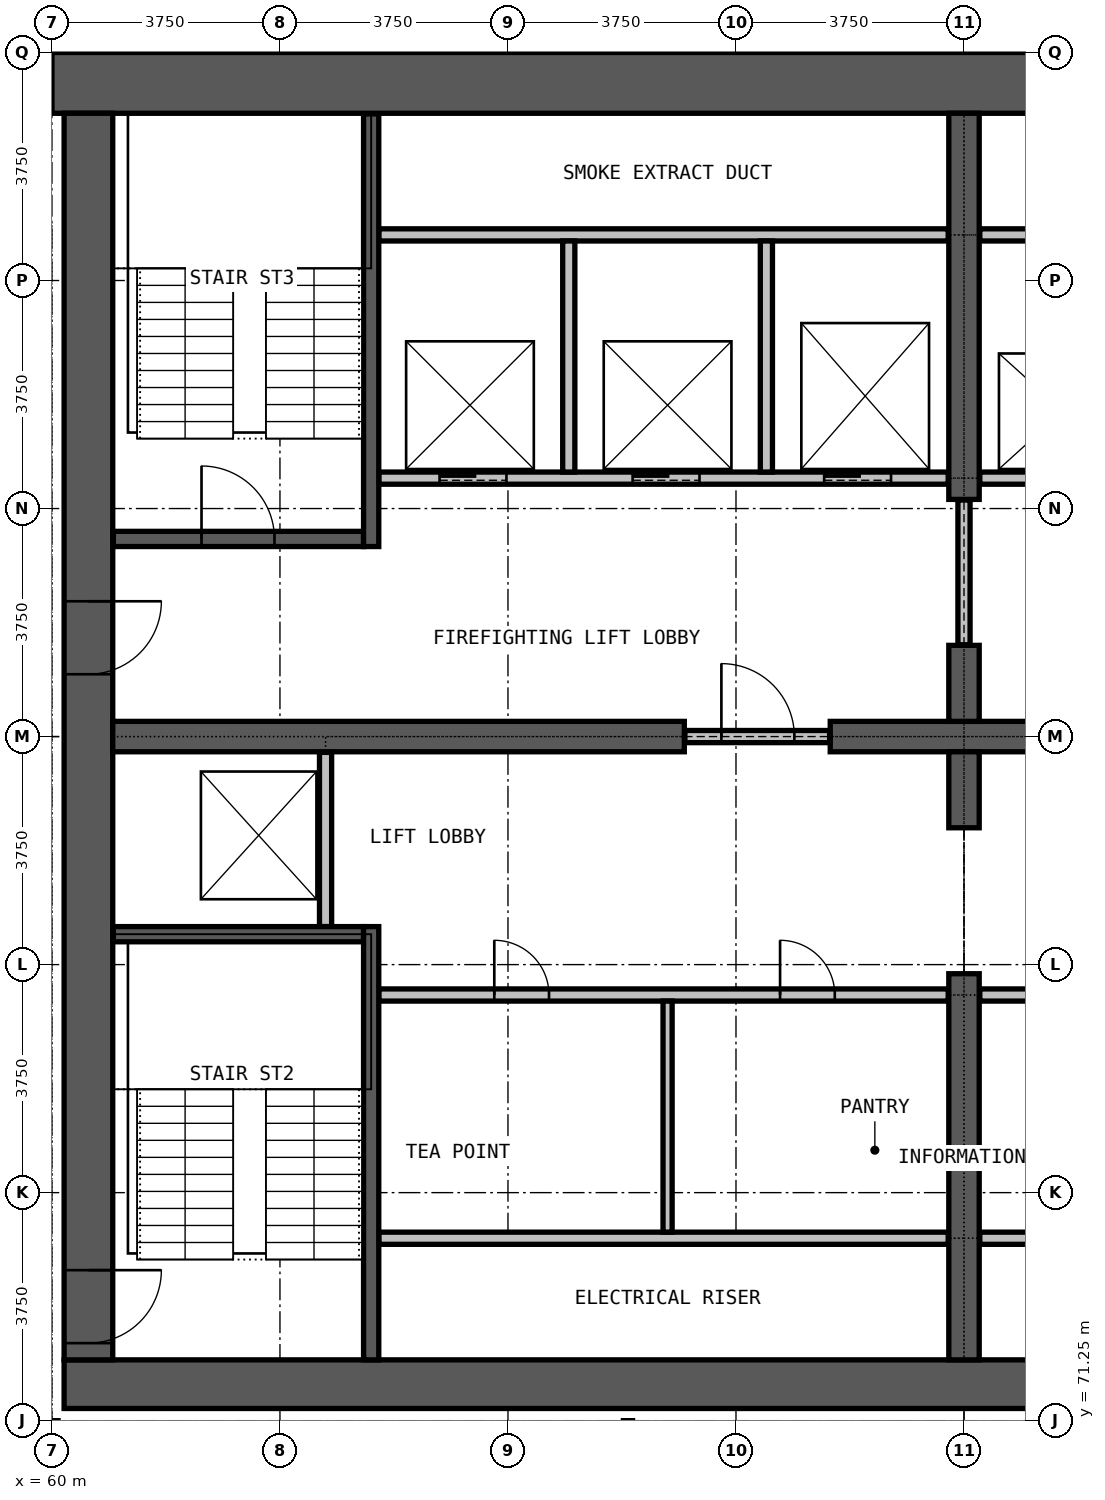
"""IFC4 building model, lengths in metres.
Left out: names, types, materials, properties, quantities, classifications, styles, units other than length and angle.
Written with IfcOpenShell. Run it as: python <this file> out.ifc"""

import sys

from ifc_helpers import new_model, si_unit, direction, frame, frame_2d, origin, place, context, subcontext, project, spatial, rectangle, extrude, element, fill, save


model = new_model("IFC4")
c1 = context("Model", 3, precision=1e-05, world=origin(), true_north=direction((0.0, 1.0)))
c2 = subcontext(c1, "Body", "Model", "MODEL_VIEW")
j1 = project(units=[si_unit("LENGTHUNIT", "METRE"), si_unit("PLANEANGLEUNIT", "RADIAN")], contexts=[c1])
p1 = place(None, origin())
s1 = spatial("IfcSite", under=j1, at=p1, CompositionType="ELEMENT")
p2 = place(p1, origin())
s2 = spatial("IfcBuilding", under=s1, at=p2, CompositionType="ELEMENT")
p3 = place(p2, frame((0.0, 0.0, 180.1)))
s3 = spatial("IfcBuildingStorey", under=s2, at=p3, CompositionType="ELEMENT", Elevation=180.1)
p4 = place(p3, frame((60.2, 71.85, 0.0), z_axis=(0.0, 0.0, 1.0), x_axis=(1.0, 0.0, 0.0)))
e1 = element("IfcWall", 1, at=p4, inside=s3, PredefinedType="SHEAR", context=c2, shape_type="SweptSolid", body=[
    extrude(rectangle(XDim=29.6, YDim=0.8, at=frame_2d((14.8, 0.0))), origin(), (0.0, 0.0, 1.0), 3.6),
])
p5 = place(p3, frame((90.0, 93.25, 0.0), z_axis=(0.0, 0.0, 1.0), x_axis=(-1.0, 0.0, 0.0)))
e2 = element("IfcWall", 2, at=p5, inside=s3, PredefinedType="SHEAR", context=c2, shape_type="SweptSolid", body=[
    extrude(rectangle(XDim=30.0, YDim=1.0, at=frame_2d((15.0, 0.0))), origin(), (0.0, 0.0, 1.0), 3.6),
])
p6 = place(p3, frame((60.6, 92.75, 0.0), z_axis=(0.0, 0.0, 1.0), x_axis=(0.0, -1.0, 0.0)))
e3 = element("IfcWall", 3, at=p6, inside=s3, PredefinedType="SHEAR", context=c2, shape_type="SweptSolid", body=[
    extrude(rectangle(XDim=20.5, YDim=0.8, at=frame_2d((10.25, 0.0))), origin(), (0.0, 0.0, 1.0), 3.6),
])
p7 = place(p6, frame((19.025, 0.0, 0.0)))
e4 = element("IfcOpeningElement", 4, at=p7, cuts=e3, PredefinedType="OPENING", context=c2, shape_type="SweptSolid", body=[
    extrude(rectangle(XDim=1.2, YDim=2.2, at=frame_2d((0.6, 1.1))), frame((0.0, 0.41, 0.0), z_axis=(0.0, -1.0, 0.0), x_axis=(1.0, 0.0, 0.0)), (0.0, 0.0, 1.0), 0.82),
])
p8 = place(p6, frame((8.025, 0.0, 0.0)))
e5 = element("IfcOpeningElement", 5, at=p8, cuts=e3, PredefinedType="OPENING", context=c2, shape_type="SweptSolid", body=[
    extrude(rectangle(XDim=1.2, YDim=2.2, at=frame_2d((0.6, 1.1))), frame((0.0, 0.41, 0.0), z_axis=(0.0, -1.0, 0.0), x_axis=(1.0, 0.0, 0.0)), (0.0, 0.0, 1.0), 0.82),
])
p9 = place(p3, frame((61.0, 82.5, 0.0), z_axis=(0.0, 0.0, 1.0), x_axis=(1.0, 0.0, 0.0)))
e6 = element("IfcWall", 6, at=p9, inside=s3, PredefinedType="SHEAR", context=c2, shape_type="SweptSolid", body=[
    extrude(rectangle(XDim=9.4, YDim=0.5, at=frame_2d((4.7, 0.0))), origin(), (0.0, 0.0, 1.0), 3.6),
])
p10 = place(p3, frame((72.8, 82.5, 0.0), z_axis=(0.0, 0.0, 1.0), x_axis=(1.0, 0.0, 0.0)))
e7 = element("IfcWall", 7, at=p10, inside=s3, PredefinedType="SHEAR", context=c2, shape_type="SweptSolid", body=[
    extrude(rectangle(XDim=4.4, YDim=0.5, at=frame_2d((2.2, 0.0))), origin(), (0.0, 0.0, 1.0), 3.6),
])
p11 = place(p3, frame((75.0, 72.25, 0.0), z_axis=(0.0, 0.0, 1.0), x_axis=(0.0, 1.0, 0.0)))
e8 = element("IfcWall", 8, at=p11, inside=s3, PredefinedType="SHEAR", context=c2, shape_type="SweptSolid", body=[
    extrude(rectangle(XDim=6.35, YDim=0.5, at=frame_2d((3.175, 0.0))), origin(), (0.0, 0.0, 1.0), 3.6),
])
for number, where, z_axis, x_axis in (
    (9, (75.0, 81.0, 0.0), (0.0, 0.0, 1.0), (0.0, 1.0, 0.0)),
    (10, (75.0, 82.75, 0.0), (0.0, 0.0, 1.0), (0.0, 1.0, 0.0)),
):
    element("IfcWall", number, at=place(p3, frame(where, z_axis=z_axis, x_axis=x_axis)), inside=s3, PredefinedType="SHEAR", context=c2, shape_type="SweptSolid", body=[
        extrude(rectangle(XDim=1.25, YDim=0.5, at=frame_2d((0.625, 0.0))), origin(), (0.0, 0.0, 1.0), 3.6),
    ])
p12 = place(p3, frame((75.0, 86.4, 0.0), z_axis=(0.0, 0.0, 1.0), x_axis=(0.0, 1.0, 0.0)))
e11 = element("IfcWall", 11, at=p12, inside=s3, PredefinedType="SHEAR", context=c2, shape_type="SweptSolid", body=[
    extrude(rectangle(XDim=6.35, YDim=0.5, at=frame_2d((3.175, 0.0))), origin(), (0.0, 0.0, 1.0), 3.6),
])
for number, where, z_axis, x_axis in (
    (12, (65.375, 74.25, 0.0), (0.0, 0.0, 1.0), (1.0, 0.0, 0.0)),
    (13, (75.26, 74.25, 0.0), (0.0, 0.0, 1.0), (1.0, 0.0, 0.0)),
):
    element("IfcWall", number, at=place(p3, frame(where, z_axis=z_axis, x_axis=x_axis)), inside=s3, PredefinedType="PARTITIONING", context=c2, shape_type="SweptSolid", body=[
        extrude(rectangle(XDim=9.365, YDim=0.2, at=frame_2d((4.683, 0.0))), origin(), (0.0, 0.0, 1.0), 3.25),
    ])
p13 = place(p3, frame((65.375, 78.25, 0.0), z_axis=(0.0, 0.0, 1.0), x_axis=(1.0, 0.0, 0.0)))
e14 = element("IfcWall", 14, at=p13, inside=s3, PredefinedType="PARTITIONING", context=c2, shape_type="SweptSolid", body=[
    extrude(rectangle(XDim=9.365, YDim=0.2, at=frame_2d((4.683, 0.0))), origin(), (0.0, 0.0, 1.0), 3.25),
])
p14 = place(p13, frame((1.9, 0.0, 0.0)))
e15 = element("IfcOpeningElement", 15, at=p14, cuts=e14, PredefinedType="OPENING", context=c2, shape_type="SweptSolid", body=[
    extrude(rectangle(XDim=0.9, YDim=2.2, at=frame_2d((0.45, 1.1))), frame((0.0, 0.11, 0.0), z_axis=(0.0, -1.0, 0.0), x_axis=(1.0, 0.0, 0.0)), (0.0, 0.0, 1.0), 0.22),
])
p15 = place(p13, frame((6.6, 0.0, 0.0)))
e16 = element("IfcOpeningElement", 16, at=p15, cuts=e14, PredefinedType="OPENING", context=c2, shape_type="SweptSolid", body=[
    extrude(rectangle(XDim=0.9, YDim=2.2, at=frame_2d((0.45, 1.1))), frame((0.0, 0.11, 0.0), z_axis=(0.0, -1.0, 0.0), x_axis=(1.0, 0.0, 0.0)), (0.0, 0.0, 1.0), 0.22),
])
p16 = place(p3, frame((75.26, 78.25, 0.0), z_axis=(0.0, 0.0, 1.0), x_axis=(1.0, 0.0, 0.0)))
e17 = element("IfcWall", 17, at=p16, inside=s3, PredefinedType="PARTITIONING", context=c2, shape_type="SweptSolid", body=[
    extrude(rectangle(XDim=9.365, YDim=0.2, at=frame_2d((4.683, 0.0))), origin(), (0.0, 0.0, 1.0), 3.25),
])
p17 = place(p16, frame((0.9, 0.0, 0.0)))
e18 = element("IfcOpeningElement", 18, at=p17, cuts=e17, PredefinedType="OPENING", context=c2, shape_type="SweptSolid", body=[
    extrude(rectangle(XDim=0.9, YDim=2.2, at=frame_2d((0.45, 1.1))), frame((0.0, 0.11, 0.0), z_axis=(0.0, -1.0, 0.0), x_axis=(1.0, 0.0, 0.0)), (0.0, 0.0, 1.0), 0.22),
])
p18 = place(p16, frame((5.58, 0.0, 0.0)))
e19 = element("IfcOpeningElement", 19, at=p18, cuts=e17, PredefinedType="OPENING", context=c2, shape_type="SweptSolid", body=[
    extrude(rectangle(XDim=0.9, YDim=2.2, at=frame_2d((0.45, 1.1))), frame((0.0, 0.11, 0.0), z_axis=(0.0, -1.0, 0.0), x_axis=(1.0, 0.0, 0.0)), (0.0, 0.0, 1.0), 0.22),
])
p19 = place(p3, frame((70.41, 82.5, 0.0), z_axis=(0.0, 0.0, 1.0), x_axis=(1.0, 0.0, 0.0)))
e20 = element("IfcWall", 20, at=p19, inside=s3, PredefinedType="PARTITIONING", context=c2, shape_type="SweptSolid", body=[
    extrude(rectangle(XDim=2.38, YDim=0.2, at=frame_2d((1.19, 0.0))), origin(), (0.0, 0.0, 1.0), 2.4),
])
p20 = place(p19, frame((0.6, 0.0, 0.0)))
e21 = element("IfcOpeningElement", 21, at=p20, cuts=e20, PredefinedType="OPENING", context=c2, shape_type="SweptSolid", body=[
    extrude(rectangle(XDim=1.2, YDim=2.2, at=frame_2d((0.6, 1.1))), frame((0.0, 0.11, 0.0), z_axis=(0.0, -1.0, 0.0), x_axis=(1.0, 0.0, 0.0)), (0.0, 0.0, 1.0), 0.22),
])
p21 = place(p3, frame((75.0, 84.01, 0.0), z_axis=(0.0, 0.0, 1.0), x_axis=(0.0, 1.0, 0.0)))
e22 = element("IfcWall", 22, at=p21, inside=s3, PredefinedType="PARTITIONING", context=c2, shape_type="SweptSolid", body=[
    extrude(rectangle(XDim=2.38, YDim=0.2, at=frame_2d((1.19, 0.0))), origin(), (0.0, 0.0, 1.0), 2.4),
])
p22 = place(p3, frame((70.125, 74.35, 0.0), z_axis=(0.0, 0.0, 1.0), x_axis=(0.0, 1.0, 0.0)))
e23 = element("IfcWall", 23, at=p22, inside=s3, PredefinedType="PARTITIONING", context=c2, shape_type="SweptSolid", body=[
    extrude(rectangle(XDim=3.8, YDim=0.15, at=frame_2d((1.9, 0.0))), origin(), (0.0, 0.0, 1.0), 3.25),
])
p23 = place(p3, frame((65.375, 86.75, 0.0), z_axis=(0.0, 0.0, 1.0), x_axis=(1.0, 0.0, 0.0)))
e24 = element("IfcWall", 24, at=p23, inside=s3, PredefinedType="PARTITIONING", context=c2, shape_type="SweptSolid", body=[
    extrude(rectangle(XDim=9.365, YDim=0.2, at=frame_2d((4.683, 0.0))), origin(), (0.0, 0.0, 1.0), 3.25),
])
p24 = place(p23, frame((1.0, 0.0, 0.0)))
e25 = element("IfcOpeningElement", 25, at=p24, cuts=e24, PredefinedType="OPENING", context=c2, shape_type="SweptSolid", body=[
    extrude(rectangle(XDim=1.1, YDim=2.2, at=frame_2d((0.55, 1.1))), frame((0.0, 0.11, 0.0), z_axis=(0.0, -1.0, 0.0), x_axis=(1.0, 0.0, 0.0)), (0.0, 0.0, 1.0), 0.22),
])
p25 = place(p23, frame((4.175, 0.0, 0.0)))
e26 = element("IfcOpeningElement", 26, at=p25, cuts=e24, PredefinedType="OPENING", context=c2, shape_type="SweptSolid", body=[
    extrude(rectangle(XDim=1.1, YDim=2.2, at=frame_2d((0.55, 1.1))), frame((0.0, 0.11, 0.0), z_axis=(0.0, -1.0, 0.0), x_axis=(1.0, 0.0, 0.0)), (0.0, 0.0, 1.0), 0.22),
])
p26 = place(p23, frame((7.325, 0.0, 0.0)))
e27 = element("IfcOpeningElement", 27, at=p26, cuts=e24, PredefinedType="OPENING", context=c2, shape_type="SweptSolid", body=[
    extrude(rectangle(XDim=1.1, YDim=2.2, at=frame_2d((0.55, 1.1))), frame((0.0, 0.11, 0.0), z_axis=(0.0, -1.0, 0.0), x_axis=(1.0, 0.0, 0.0)), (0.0, 0.0, 1.0), 0.22),
])
p27 = place(p3, frame((75.26, 86.75, 0.0), z_axis=(0.0, 0.0, 1.0), x_axis=(1.0, 0.0, 0.0)))
e28 = element("IfcWall", 28, at=p27, inside=s3, PredefinedType="PARTITIONING", context=c2, shape_type="SweptSolid", body=[
    extrude(rectangle(XDim=9.365, YDim=0.2, at=frame_2d((4.683, 0.0))), origin(), (0.0, 0.0, 1.0), 3.25),
])
p28 = place(p27, frame((0.95, 0.0, 0.0)))
e29 = element("IfcOpeningElement", 29, at=p28, cuts=e28, PredefinedType="OPENING", context=c2, shape_type="SweptSolid", body=[
    extrude(rectangle(XDim=1.1, YDim=2.2, at=frame_2d((0.55, 1.1))), frame((0.0, 0.11, 0.0), z_axis=(0.0, -1.0, 0.0), x_axis=(1.0, 0.0, 0.0)), (0.0, 0.0, 1.0), 0.22),
])
p29 = place(p27, frame((4.09, 0.0, 0.0)))
e30 = element("IfcOpeningElement", 30, at=p29, cuts=e28, PredefinedType="OPENING", context=c2, shape_type="SweptSolid", body=[
    extrude(rectangle(XDim=1.1, YDim=2.2, at=frame_2d((0.55, 1.1))), frame((0.0, 0.11, 0.0), z_axis=(0.0, -1.0, 0.0), x_axis=(1.0, 0.0, 0.0)), (0.0, 0.0, 1.0), 0.22),
])
p30 = place(p27, frame((7.24, 0.0, 0.0)))
e31 = element("IfcOpeningElement", 31, at=p30, cuts=e28, PredefinedType="OPENING", context=c2, shape_type="SweptSolid", body=[
    extrude(rectangle(XDim=1.1, YDim=2.2, at=frame_2d((0.55, 1.1))), frame((0.0, 0.11, 0.0), z_axis=(0.0, -1.0, 0.0), x_axis=(1.0, 0.0, 0.0)), (0.0, 0.0, 1.0), 0.22),
])
for number, where, z_axis, x_axis in (
    (32, (65.375, 90.75, 0.0), (0.0, 0.0, 1.0), (1.0, 0.0, 0.0)),
    (33, (75.26, 90.75, 0.0), (0.0, 0.0, 1.0), (1.0, 0.0, 0.0)),
):
    element("IfcWall", number, at=place(p3, frame(where, z_axis=z_axis, x_axis=x_axis)), inside=s3, PredefinedType="PARTITIONING", context=c2, shape_type="SweptSolid", body=[
        extrude(rectangle(XDim=9.365, YDim=0.2, at=frame_2d((4.683, 0.0))), origin(), (0.0, 0.0, 1.0), 3.25),
    ])
p31 = place(p3, frame((64.5, 79.375, 0.0), z_axis=(0.0, 0.0, 1.0), x_axis=(0.0, 1.0, 0.0)))
e34 = element("IfcWall", 34, at=p31, inside=s3, PredefinedType="PARTITIONING", context=c2, shape_type="SweptSolid", body=[
    extrude(rectangle(XDim=2.865, YDim=0.2, at=frame_2d((1.433, 0.0))), origin(), (0.0, 0.0, 1.0), 3.25),
])
for number, where, z_axis, x_axis in (
    (35, (68.5, 86.85, 0.0), (0.0, 0.0, 1.0), (0.0, 1.0, 0.0)),
    (36, (71.75, 86.85, 0.0), (0.0, 0.0, 1.0), (0.0, 1.0, 0.0)),
):
    element("IfcWall", number, at=place(p3, frame(where, z_axis=z_axis, x_axis=x_axis)), inside=s3, PredefinedType="PARTITIONING", context=c2, shape_type="SweptSolid", body=[
        extrude(rectangle(XDim=3.8, YDim=0.2, at=frame_2d((1.9, 0.0))), origin(), (0.0, 0.0, 1.0), 3.25),
    ])
p32 = place(p3, frame((61.01, 79.25, 0.0), z_axis=(0.0, 0.0, 1.0), x_axis=(1.0, 0.0, 0.0)))
e37 = element("IfcWall", 37, at=p32, inside=s3, PredefinedType="PARTITIONING", context=c2, shape_type="SweptSolid", body=[
    extrude(rectangle(XDim=4.115, YDim=0.25, at=frame_2d((2.058, 0.0))), origin(), (0.0, 0.0, 1.0), 3.25),
])
p33 = place(p3, frame((61.01, 85.75, 0.0), z_axis=(0.0, 0.0, 1.0), x_axis=(1.0, 0.0, 0.0)))
e38 = element("IfcWall", 38, at=p33, inside=s3, PredefinedType="PARTITIONING", context=c2, shape_type="SweptSolid", body=[
    extrude(rectangle(XDim=4.115, YDim=0.25, at=frame_2d((2.058, 0.0))), origin(), (0.0, 0.0, 1.0), 3.25),
])
p34 = place(p33, frame((1.45, 0.0, 0.0)))
e39 = element("IfcOpeningElement", 39, at=p34, cuts=e38, PredefinedType="OPENING", context=c2, shape_type="SweptSolid", body=[
    extrude(rectangle(XDim=1.2, YDim=2.2, at=frame_2d((0.6, 1.1))), frame((0.0, 0.135, 0.0), z_axis=(0.0, -1.0, 0.0), x_axis=(1.0, 0.0, 0.0)), (0.0, 0.0, 1.0), 0.27),
])
p35 = place(p3, frame((65.25, 72.25, 0.0), z_axis=(0.0, 0.0, 1.0), x_axis=(0.0, 1.0, 0.0)))
e40 = element("IfcWall", 40, at=p35, inside=s3, PredefinedType="PARTITIONING", context=c2, shape_type="SweptSolid", body=[
    extrude(rectangle(XDim=7.125, YDim=0.25, at=frame_2d((3.562, 0.0))), origin(), (0.0, 0.0, 1.0), 3.25),
])
p36 = place(p3, frame((65.25, 85.625, 0.0), z_axis=(0.0, 0.0, 1.0), x_axis=(0.0, 1.0, 0.0)))
e41 = element("IfcWall", 41, at=p36, inside=s3, PredefinedType="PARTITIONING", context=c2, shape_type="SweptSolid", body=[
    extrude(rectangle(XDim=7.115, YDim=0.25, at=frame_2d((3.558, 0.0))), origin(), (0.0, 0.0, 1.0), 3.25),
])
p37 = place(p24, origin())
e42 = element("IfcDoor", 42, at=p37, inside=s3, OperationType="DOUBLE_DOOR_SLIDING", PredefinedType="DOOR", context=c2, shape_type="SweptSolid", body=[
    extrude(rectangle(XDim=1.1, YDim=2.2, at=frame_2d((0.55, 1.1))), frame((0.0, 0.025, 0.0), z_axis=(0.0, -1.0, 0.0), x_axis=(1.0, 0.0, 0.0)), (0.0, 0.0, 1.0), 0.05),
])
fill(e25, e42)
p38 = place(p25, origin())
e43 = element("IfcDoor", 43, at=p38, inside=s3, OperationType="DOUBLE_DOOR_SLIDING", PredefinedType="DOOR", context=c2, shape_type="SweptSolid", body=[
    extrude(rectangle(XDim=1.1, YDim=2.2, at=frame_2d((0.55, 1.1))), frame((0.0, 0.025, 0.0), z_axis=(0.0, -1.0, 0.0), x_axis=(1.0, 0.0, 0.0)), (0.0, 0.0, 1.0), 0.05),
])
fill(e26, e43)
p39 = place(p26, origin())
e44 = element("IfcDoor", 44, at=p39, inside=s3, OperationType="DOUBLE_DOOR_SLIDING", PredefinedType="DOOR", context=c2, shape_type="SweptSolid", body=[
    extrude(rectangle(XDim=1.1, YDim=2.2, at=frame_2d((0.55, 1.1))), frame((0.0, 0.025, 0.0), z_axis=(0.0, -1.0, 0.0), x_axis=(1.0, 0.0, 0.0)), (0.0, 0.0, 1.0), 0.05),
])
fill(e27, e44)
p40 = place(p20, origin())
e45 = element("IfcDoor", 45, at=p40, inside=s3, OperationType="SINGLE_SWING_LEFT", PredefinedType="DOOR", context=c2, shape_type="SweptSolid", body=[
    extrude(rectangle(XDim=1.2, YDim=2.2, at=frame_2d((0.6, 1.1))), frame((0.0, 0.025, 0.0), z_axis=(0.0, -1.0, 0.0), x_axis=(1.0, 0.0, 0.0)), (0.0, 0.0, 1.0), 0.05),
])
fill(e21, e45)
p41 = place(p34, origin())
e46 = element("IfcDoor", 46, at=p41, inside=s3, OperationType="SINGLE_SWING_RIGHT", PredefinedType="DOOR", context=c2, shape_type="SweptSolid", body=[
    extrude(rectangle(XDim=1.2, YDim=2.2, at=frame_2d((0.6, 1.1))), frame((0.0, 0.025, 0.0), z_axis=(0.0, -1.0, 0.0), x_axis=(1.0, 0.0, 0.0)), (0.0, 0.0, 1.0), 0.05),
])
fill(e39, e46)
p42 = place(p7, origin())
e47 = element("IfcDoor", 47, at=p42, inside=s3, OperationType="SINGLE_SWING_LEFT", PredefinedType="DOOR", context=c2, shape_type="SweptSolid", body=[
    extrude(rectangle(XDim=1.2, YDim=2.2, at=frame_2d((0.6, 1.1))), frame((0.0, 0.025, 0.0), z_axis=(0.0, -1.0, 0.0), x_axis=(1.0, 0.0, 0.0)), (0.0, 0.0, 1.0), 0.05),
])
fill(e4, e47)
p43 = place(p8, origin())
e48 = element("IfcDoor", 48, at=p43, inside=s3, OperationType="SINGLE_SWING_RIGHT", PredefinedType="DOOR", context=c2, shape_type="SweptSolid", body=[
    extrude(rectangle(XDim=1.2, YDim=2.2, at=frame_2d((0.6, 1.1))), frame((0.0, 0.025, 0.0), z_axis=(0.0, -1.0, 0.0), x_axis=(1.0, 0.0, 0.0)), (0.0, 0.0, 1.0), 0.05),
])
fill(e5, e48)
p44 = place(p14, origin())
e49 = element("IfcDoor", 49, at=p44, inside=s3, OperationType="SINGLE_SWING_LEFT", PredefinedType="DOOR", context=c2, shape_type="SweptSolid", body=[
    extrude(rectangle(XDim=0.9, YDim=2.2, at=frame_2d((0.45, 1.1))), frame((0.0, 0.025, 0.0), z_axis=(0.0, -1.0, 0.0), x_axis=(1.0, 0.0, 0.0)), (0.0, 0.0, 1.0), 0.05),
])
fill(e15, e49)
p45 = place(p15, origin())
e50 = element("IfcDoor", 50, at=p45, inside=s3, OperationType="SINGLE_SWING_LEFT", PredefinedType="DOOR", context=c2, shape_type="SweptSolid", body=[
    extrude(rectangle(XDim=0.9, YDim=2.2, at=frame_2d((0.45, 1.1))), frame((0.0, 0.025, 0.0), z_axis=(0.0, -1.0, 0.0), x_axis=(1.0, 0.0, 0.0)), (0.0, 0.0, 1.0), 0.05),
])
fill(e16, e50)
save(model, sys.argv[1])
